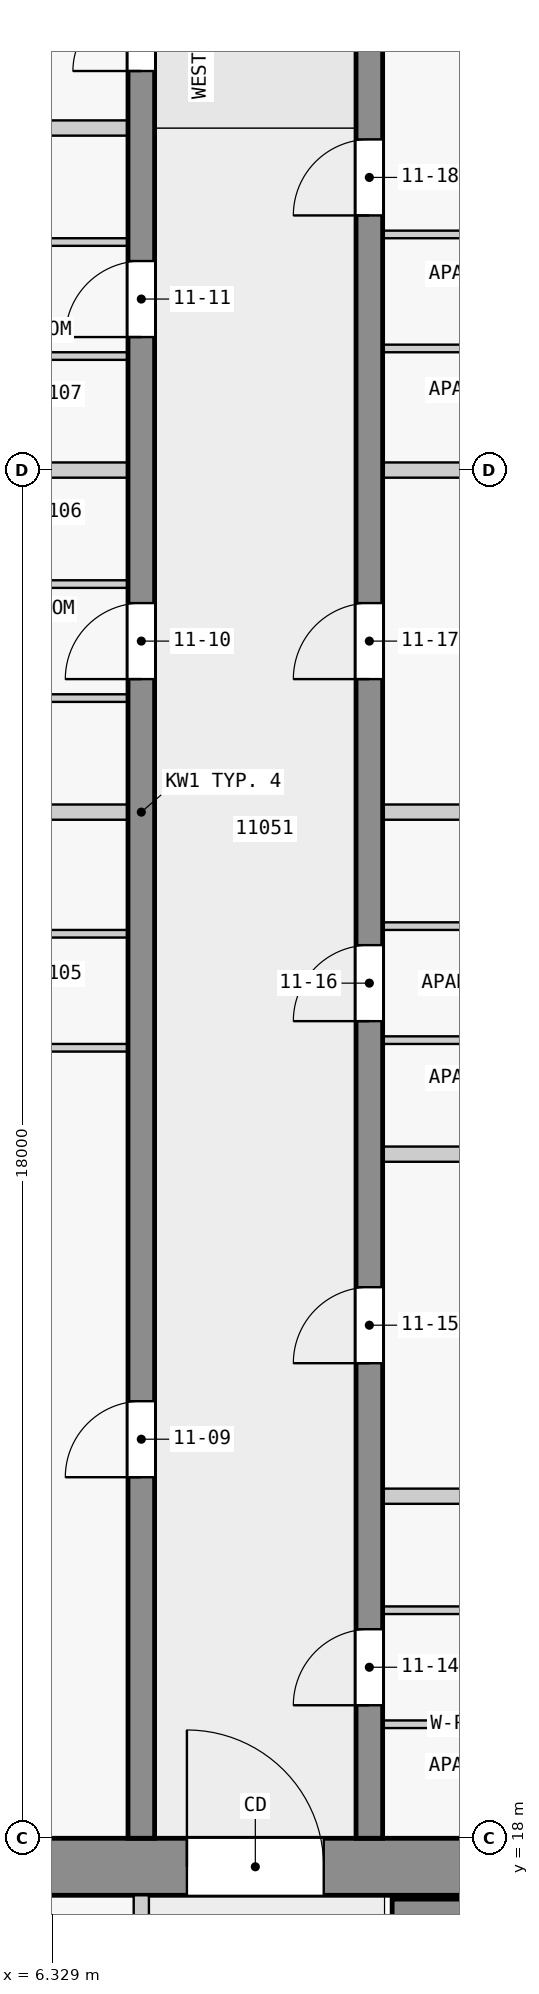
"""IFC4 building model, lengths in metres.
Left out: names, types, materials, properties, quantities, classifications, styles, units other than length and angle.
Written with IfcOpenShell. Run it as: python <this file> out.ifc"""

import sys

from ifc_helpers import new_model, si_unit, direction, frame, frame_2d, origin, place, context, subcontext, project, spatial, rectangle, extrude, element, fill, save


model = new_model("IFC4")
c1 = context("Model", 3, precision=1e-05, world=origin(), true_north=direction((0.0, 1.0)))
c2 = subcontext(c1, "Body", "Model", "MODEL_VIEW")
j1 = project(units=[si_unit("LENGTHUNIT", "METRE"), si_unit("PLANEANGLEUNIT", "RADIAN")], contexts=[c1])
p1 = place(None, origin())
s1 = spatial("IfcSite", under=j1, at=p1, CompositionType="ELEMENT")
p2 = place(p1, origin())
s2 = spatial("IfcBuilding", under=s1, at=p2, CompositionType="ELEMENT")
p3 = place(p2, frame((0.0, 0.0, 47.8)))
s3 = spatial("IfcBuildingStorey", under=s2, at=p3, CompositionType="ELEMENT", Elevation=47.8)
p4 = place(p3, frame((1.55, 17.625, 0.0), z_axis=(0.0, 0.0, 1.0), x_axis=(1.0, 0.0, 0.0)))
e1 = element("IfcWall", 1, at=p4, inside=s3, PredefinedType="SHEAR", context=c2, shape_type="SweptSolid", body=[
    extrude(rectangle(XDim=20.95, YDim=0.75, at=frame_2d((10.475, 0.0))), origin(), (0.0, 0.0, 1.0), 3.25),
])
p5 = place(p4, frame((6.55, 0.0, 0.0)))
e2 = element("IfcOpeningElement", 2, at=p5, cuts=e1, PredefinedType="OPENING", context=c2, shape_type="SweptSolid", body=[
    extrude(rectangle(XDim=1.8, YDim=2.1, at=frame_2d((0.9, 1.05))), frame((0.0, 0.385, 0.0), z_axis=(0.0, -1.0, 0.0), x_axis=(1.0, 0.0, 0.0)), (0.0, 0.0, 1.0), 0.77),
])
p6 = place(p3, frame((10.8, 17.05, 0.0), z_axis=(0.0, 0.0, 1.0), x_axis=(1.0, 0.0, 0.0)))
e3 = element("IfcWall", 3, at=p6, inside=s3, PredefinedType="SHEAR", context=c2, shape_type="SweptSolid", body=[
    extrude(rectangle(XDim=7.8, YDim=0.3, at=frame_2d((3.9, 0.0))), origin(), (0.0, 0.0, 1.0), 3.25),
])
p7 = place(p3, frame((7.5, 18.0, 0.0), z_axis=(0.0, 0.0, 1.0), x_axis=(0.0, 1.0, 0.0)))
e4 = element("IfcWall", 4, at=p7, inside=s3, PredefinedType="SHEAR", context=c2, shape_type="SweptSolid", body=[
    extrude(rectangle(XDim=27.0, YDim=0.35, at=frame_2d((13.5, 0.0))), origin(), (0.0, 0.0, 1.0), 3.25),
])
p8 = place(p7, frame((4.75, 0.0, 0.0)))
e5 = element("IfcOpeningElement", 5, at=p8, cuts=e4, PredefinedType="OPENING", context=c2, shape_type="SweptSolid", body=[
    extrude(rectangle(XDim=1.0, YDim=2.1, at=frame_2d((0.5, 1.05))), frame((0.0, 0.185, 0.0), z_axis=(0.0, -1.0, 0.0), x_axis=(1.0, 0.0, 0.0)), (0.0, 0.0, 1.0), 0.37),
])
p9 = place(p7, frame((15.25, 0.0, 0.0)))
e6 = element("IfcOpeningElement", 6, at=p9, cuts=e4, PredefinedType="OPENING", context=c2, shape_type="SweptSolid", body=[
    extrude(rectangle(XDim=1.0, YDim=2.1, at=frame_2d((0.5, 1.05))), frame((0.0, 0.185, 0.0), z_axis=(0.0, -1.0, 0.0), x_axis=(1.0, 0.0, 0.0)), (0.0, 0.0, 1.0), 0.37),
])
p10 = place(p7, frame((19.75, 0.0, 0.0)))
e7 = element("IfcOpeningElement", 7, at=p10, cuts=e4, PredefinedType="OPENING", context=c2, shape_type="SweptSolid", body=[
    extrude(rectangle(XDim=1.0, YDim=2.1, at=frame_2d((0.5, 1.05))), frame((0.0, 0.185, 0.0), z_axis=(0.0, -1.0, 0.0), x_axis=(1.0, 0.0, 0.0)), (0.0, 0.0, 1.0), 0.37),
])
p11 = place(p7, frame((23.25, 0.0, 0.0)))
e8 = element("IfcOpeningElement", 8, at=p11, cuts=e4, PredefinedType="OPENING", context=c2, shape_type="SweptSolid", body=[
    extrude(rectangle(XDim=0.9, YDim=2.1, at=frame_2d((0.45, 1.05))), frame((0.0, 0.185, 0.0), z_axis=(0.0, -1.0, 0.0), x_axis=(1.0, 0.0, 0.0)), (0.0, 0.0, 1.0), 0.37),
])
p12 = place(p7, frame((25.45, 0.0, 0.0)))
e9 = element("IfcOpeningElement", 9, at=p12, cuts=e4, PredefinedType="OPENING", context=c2, shape_type="SweptSolid", body=[
    extrude(rectangle(XDim=1.0, YDim=2.1, at=frame_2d((0.5, 1.05))), frame((0.0, 0.185, 0.0), z_axis=(0.0, -1.0, 0.0), x_axis=(1.0, 0.0, 0.0)), (0.0, 0.0, 1.0), 0.37),
])
p13 = place(p3, frame((10.5, 18.0, 0.0), z_axis=(0.0, 0.0, 1.0), x_axis=(0.0, 1.0, 0.0)))
e10 = element("IfcWall", 10, at=p13, inside=s3, PredefinedType="SHEAR", context=c2, shape_type="SweptSolid", body=[
    extrude(rectangle(XDim=27.0, YDim=0.35, at=frame_2d((13.5, 0.0))), origin(), (0.0, 0.0, 1.0), 3.25),
])
p14 = place(p13, frame((1.75, 0.0, 0.0)))
e11 = element("IfcOpeningElement", 11, at=p14, cuts=e10, PredefinedType="OPENING", context=c2, shape_type="SweptSolid", body=[
    extrude(rectangle(XDim=1.0, YDim=2.1, at=frame_2d((0.5, 1.05))), frame((0.0, 0.185, 0.0), z_axis=(0.0, -1.0, 0.0), x_axis=(1.0, 0.0, 0.0)), (0.0, 0.0, 1.0), 0.37),
])
p15 = place(p13, frame((6.25, 0.0, 0.0)))
e12 = element("IfcOpeningElement", 12, at=p15, cuts=e10, PredefinedType="OPENING", context=c2, shape_type="SweptSolid", body=[
    extrude(rectangle(XDim=1.0, YDim=2.1, at=frame_2d((0.5, 1.05))), frame((0.0, 0.185, 0.0), z_axis=(0.0, -1.0, 0.0), x_axis=(1.0, 0.0, 0.0)), (0.0, 0.0, 1.0), 0.37),
])
p16 = place(p13, frame((10.75, 0.0, 0.0)))
e13 = element("IfcOpeningElement", 13, at=p16, cuts=e10, PredefinedType="OPENING", context=c2, shape_type="SweptSolid", body=[
    extrude(rectangle(XDim=1.0, YDim=2.1, at=frame_2d((0.5, 1.05))), frame((0.0, 0.185, 0.0), z_axis=(0.0, -1.0, 0.0), x_axis=(1.0, 0.0, 0.0)), (0.0, 0.0, 1.0), 0.37),
])
p17 = place(p13, frame((15.25, 0.0, 0.0)))
e14 = element("IfcOpeningElement", 14, at=p17, cuts=e10, PredefinedType="OPENING", context=c2, shape_type="SweptSolid", body=[
    extrude(rectangle(XDim=1.0, YDim=2.1, at=frame_2d((0.5, 1.05))), frame((0.0, 0.185, 0.0), z_axis=(0.0, -1.0, 0.0), x_axis=(1.0, 0.0, 0.0)), (0.0, 0.0, 1.0), 0.37),
])
p18 = place(p13, frame((21.35, 0.0, 0.0)))
e15 = element("IfcOpeningElement", 15, at=p18, cuts=e10, PredefinedType="OPENING", context=c2, shape_type="SweptSolid", body=[
    extrude(rectangle(XDim=1.0, YDim=2.1, at=frame_2d((0.5, 1.05))), frame((0.0, 0.185, 0.0), z_axis=(0.0, -1.0, 0.0), x_axis=(1.0, 0.0, 0.0)), (0.0, 0.0, 1.0), 0.37),
])
p19 = place(p3, frame((7.5, 10.1, 0.0), z_axis=(0.0, 0.0, 1.0), x_axis=(0.0, 1.0, 0.0)))
e16 = element("IfcWall", 16, at=p19, inside=s3, PredefinedType="PARTITIONING", context=c2, shape_type="SweptSolid", body=[
    extrude(rectangle(XDim=7.15, YDim=0.2, at=frame_2d((3.575, 0.0))), origin(), (0.0, 0.0, 1.0), 3.25),
])
p20 = place(p19, frame((1.5, 0.0, 0.0)))
e17 = element("IfcOpeningElement", 17, at=p20, cuts=e16, PredefinedType="OPENING", context=c2, shape_type="SweptSolid", body=[
    extrude(rectangle(XDim=0.9, YDim=2.1, at=frame_2d((0.45, 1.05))), frame((0.0, 0.11, 0.0), z_axis=(0.0, -1.0, 0.0), x_axis=(1.0, 0.0, 0.0)), (0.0, 0.0, 1.0), 0.22),
])
p21 = place(p19, frame((5.075, 0.0, 0.0)))
e18 = element("IfcOpeningElement", 18, at=p21, cuts=e16, PredefinedType="OPENING", context=c2, shape_type="SweptSolid", body=[
    extrude(rectangle(XDim=0.9, YDim=2.1, at=frame_2d((0.45, 1.05))), frame((0.0, 0.11, 0.0), z_axis=(0.0, -1.0, 0.0), x_axis=(1.0, 0.0, 0.0)), (0.0, 0.0, 1.0), 0.22),
])
p22 = place(p3, frame((14.075, 19.5, 0.0), z_axis=(0.0, 0.0, 1.0), x_axis=(-1.0, 0.0, 0.0)))
e19 = element("IfcWall", 19, at=p22, inside=s3, PredefinedType="PARTITIONING", context=c2, shape_type="SweptSolid", body=[
    extrude(rectangle(XDim=3.4, YDim=0.1, at=frame_2d((1.7, 0.0))), origin(), (0.0, 0.0, 1.0), 3.25),
])
p23 = place(p22, frame((1.25, 0.0, 0.0)))
e20 = element("IfcOpeningElement", 20, at=p23, cuts=e19, PredefinedType="OPENING", context=c2, shape_type="SweptSolid", body=[
    extrude(rectangle(XDim=0.9, YDim=2.1, at=frame_2d((0.45, 1.05))), frame((0.0, 0.06, 0.0), z_axis=(0.0, -1.0, 0.0), x_axis=(1.0, 0.0, 0.0)), (0.0, 0.0, 1.0), 0.12),
])
p24 = place(p3, frame((10.675, 21.0, 0.0), z_axis=(0.0, 0.0, 1.0), x_axis=(1.0, 0.0, 0.0)))
e21 = element("IfcWall", 21, at=p24, inside=s3, PredefinedType="PARTITIONING", context=c2, shape_type="SweptSolid", body=[
    extrude(rectangle(XDim=3.4, YDim=0.1, at=frame_2d((1.7, 0.0))), origin(), (0.0, 0.0, 1.0), 3.25),
])
p25 = place(p24, frame((1.25, 0.0, 0.0)))
e22 = element("IfcOpeningElement", 22, at=p25, cuts=e21, PredefinedType="OPENING", context=c2, shape_type="SweptSolid", body=[
    extrude(rectangle(XDim=0.9, YDim=2.1, at=frame_2d((0.45, 1.05))), frame((0.0, 0.06, 0.0), z_axis=(0.0, -1.0, 0.0), x_axis=(1.0, 0.0, 0.0)), (0.0, 0.0, 1.0), 0.12),
])
p26 = place(p3, frame((13.975, 22.5, 0.0), z_axis=(0.0, 0.0, 1.0), x_axis=(-1.0, 0.0, 0.0)))
e23 = element("IfcWall", 23, at=p26, inside=s3, PredefinedType="PARTITIONING", context=c2, shape_type="SweptSolid", body=[
    extrude(rectangle(XDim=3.3, YDim=0.2, at=frame_2d((1.65, 0.0))), origin(), (0.0, 0.0, 1.0), 3.25),
])
p27 = place(p3, frame((18.08, 27.0, 0.0), z_axis=(0.0, 0.0, 1.0), x_axis=(-1.0, 0.0, 0.0)))
e24 = element("IfcWall", 24, at=p27, inside=s3, PredefinedType="PARTITIONING", context=c2, shape_type="SweptSolid", body=[
    extrude(rectangle(XDim=7.405, YDim=0.2, at=frame_2d((3.703, 0.0))), origin(), (0.0, 0.0, 1.0), 3.25),
])
p28 = place(p3, frame((3.975, 28.4, 0.0), z_axis=(0.0, 0.0, 1.0), x_axis=(1.0, 0.0, 0.0)))
e25 = element("IfcWall", 25, at=p28, inside=s3, PredefinedType="PARTITIONING", context=c2, shape_type="SweptSolid", body=[
    extrude(rectangle(XDim=3.35, YDim=0.1, at=frame_2d((1.675, 0.0))), origin(), (0.0, 0.0, 1.0), 3.25),
])
p29 = place(p28, frame((1.25, 0.0, 0.0)))
e26 = element("IfcOpeningElement", 26, at=p29, cuts=e25, PredefinedType="OPENING", context=c2, shape_type="SweptSolid", body=[
    extrude(rectangle(XDim=0.9, YDim=2.1, at=frame_2d((0.45, 1.05))), frame((0.0, 0.06, 0.0), z_axis=(0.0, -1.0, 0.0), x_axis=(1.0, 0.0, 0.0)), (0.0, 0.0, 1.0), 0.12),
])
p30 = place(p3, frame((14.075, 28.5, 0.0), z_axis=(0.0, 0.0, 1.0), x_axis=(-1.0, 0.0, 0.0)))
e27 = element("IfcWall", 27, at=p30, inside=s3, PredefinedType="PARTITIONING", context=c2, shape_type="SweptSolid", body=[
    extrude(rectangle(XDim=3.4, YDim=0.1, at=frame_2d((1.7, 0.0))), origin(), (0.0, 0.0, 1.0), 3.25),
])
p31 = place(p30, frame((1.25, 0.0, 0.0)))
e28 = element("IfcOpeningElement", 28, at=p31, cuts=e27, PredefinedType="OPENING", context=c2, shape_type="SweptSolid", body=[
    extrude(rectangle(XDim=0.9, YDim=2.1, at=frame_2d((0.45, 1.05))), frame((0.0, 0.06, 0.0), z_axis=(0.0, -1.0, 0.0), x_axis=(1.0, 0.0, 0.0)), (0.0, 0.0, 1.0), 0.12),
])
p32 = place(p3, frame((7.325, 29.9, 0.0), z_axis=(0.0, 0.0, 1.0), x_axis=(-1.0, 0.0, 0.0)))
e29 = element("IfcWall", 29, at=p32, inside=s3, PredefinedType="PARTITIONING", context=c2, shape_type="SweptSolid", body=[
    extrude(rectangle(XDim=3.35, YDim=0.1, at=frame_2d((1.675, 0.0))), origin(), (0.0, 0.0, 1.0), 3.25),
])
p33 = place(p3, frame((10.675, 30.0, 0.0), z_axis=(0.0, 0.0, 1.0), x_axis=(1.0, 0.0, 0.0)))
e30 = element("IfcWall", 30, at=p33, inside=s3, PredefinedType="PARTITIONING", context=c2, shape_type="SweptSolid", body=[
    extrude(rectangle(XDim=3.4, YDim=0.1, at=frame_2d((1.7, 0.0))), origin(), (0.0, 0.0, 1.0), 3.25),
])
p34 = place(p33, frame((1.25, 0.0, 0.0)))
e31 = element("IfcOpeningElement", 31, at=p34, cuts=e30, PredefinedType="OPENING", context=c2, shape_type="SweptSolid", body=[
    extrude(rectangle(XDim=0.9, YDim=2.1, at=frame_2d((0.45, 1.05))), frame((0.0, 0.06, 0.0), z_axis=(0.0, -1.0, 0.0), x_axis=(1.0, 0.0, 0.0)), (0.0, 0.0, 1.0), 0.12),
])
for number, where, z_axis, x_axis in (
    (32, (7.325, 31.5, 0.0), (0.0, 0.0, 1.0), (-1.0, 0.0, 0.0)),
    (33, (13.975, 31.5, 0.0), (0.0, 0.0, 1.0), (-1.0, 0.0, 0.0)),
):
    element("IfcWall", number, at=place(p3, frame(where, z_axis=z_axis, x_axis=x_axis)), inside=s3, PredefinedType="PARTITIONING", context=c2, shape_type="SweptSolid", body=[
        extrude(rectangle(XDim=3.3, YDim=0.2, at=frame_2d((1.65, 0.0))), origin(), (0.0, 0.0, 1.0), 3.25),
    ])
p35 = place(p3, frame((7.325, 33.0, 0.0), z_axis=(0.0, 0.0, 1.0), x_axis=(-1.0, 0.0, 0.0)))
e34 = element("IfcWall", 34, at=p35, inside=s3, PredefinedType="PARTITIONING", context=c2, shape_type="SweptSolid", body=[
    extrude(rectangle(XDim=3.35, YDim=0.1, at=frame_2d((1.675, 0.0))), origin(), (0.0, 0.0, 1.0), 3.25),
])
p36 = place(p35, frame((1.25, 0.0, 0.0)))
e35 = element("IfcOpeningElement", 35, at=p36, cuts=e34, PredefinedType="OPENING", context=c2, shape_type="SweptSolid", body=[
    extrude(rectangle(XDim=0.9, YDim=2.1, at=frame_2d((0.45, 1.05))), frame((0.0, 0.06, 0.0), z_axis=(0.0, -1.0, 0.0), x_axis=(1.0, 0.0, 0.0)), (0.0, 0.0, 1.0), 0.12),
])
p37 = place(p3, frame((3.925, 34.5, 0.0), z_axis=(0.0, 0.0, 1.0), x_axis=(1.0, 0.0, 0.0)))
e36 = element("IfcWall", 36, at=p37, inside=s3, PredefinedType="PARTITIONING", context=c2, shape_type="SweptSolid", body=[
    extrude(rectangle(XDim=3.4, YDim=0.1, at=frame_2d((1.7, 0.0))), origin(), (0.0, 0.0, 1.0), 3.25),
])
p38 = place(p37, frame((1.25, 0.0, 0.0)))
e37 = element("IfcOpeningElement", 37, at=p38, cuts=e36, PredefinedType="OPENING", context=c2, shape_type="SweptSolid", body=[
    extrude(rectangle(XDim=0.9, YDim=2.1, at=frame_2d((0.45, 1.05))), frame((0.0, 0.06, 0.0), z_axis=(0.0, -1.0, 0.0), x_axis=(1.0, 0.0, 0.0)), (0.0, 0.0, 1.0), 0.12),
])
p39 = place(p3, frame((7.325, 36.0, 0.0), z_axis=(0.0, 0.0, 1.0), x_axis=(-1.0, 0.0, 0.0)))
e38 = element("IfcWall", 38, at=p39, inside=s3, PredefinedType="PARTITIONING", context=c2, shape_type="SweptSolid", body=[
    extrude(rectangle(XDim=3.4, YDim=0.2, at=frame_2d((1.7, 0.0))), origin(), (0.0, 0.0, 1.0), 3.25),
])
p40 = place(p3, frame((16.6, 36.0, 0.0), z_axis=(0.0, 0.0, 1.0), x_axis=(-1.0, 0.0, 0.0)))
e39 = element("IfcWall", 39, at=p40, inside=s3, PredefinedType="PARTITIONING", context=c2, shape_type="SweptSolid", body=[
    extrude(rectangle(XDim=5.925, YDim=0.2, at=frame_2d((2.962, 0.0))), origin(), (0.0, 0.0, 1.0), 3.25),
])
p41 = place(p3, frame((7.325, 37.5, 0.0), z_axis=(0.0, 0.0, 1.0), x_axis=(-1.0, 0.0, 0.0)))
e40 = element("IfcWall", 40, at=p41, inside=s3, PredefinedType="PARTITIONING", context=c2, shape_type="SweptSolid", body=[
    extrude(rectangle(XDim=3.4, YDim=0.1, at=frame_2d((1.7, 0.0))), origin(), (0.0, 0.0, 1.0), 3.25),
])
p42 = place(p41, frame((1.25, 0.0, 0.0)))
e41 = element("IfcOpeningElement", 41, at=p42, cuts=e40, PredefinedType="OPENING", context=c2, shape_type="SweptSolid", body=[
    extrude(rectangle(XDim=0.9, YDim=2.1, at=frame_2d((0.45, 1.05))), frame((0.0, 0.06, 0.0), z_axis=(0.0, -1.0, 0.0), x_axis=(1.0, 0.0, 0.0)), (0.0, 0.0, 1.0), 0.12),
])
p43 = place(p3, frame((14.075, 37.6, 0.0), z_axis=(0.0, 0.0, 1.0), x_axis=(-1.0, 0.0, 0.0)))
e42 = element("IfcWall", 42, at=p43, inside=s3, PredefinedType="PARTITIONING", context=c2, shape_type="SweptSolid", body=[
    extrude(rectangle(XDim=3.4, YDim=0.1, at=frame_2d((1.7, 0.0))), origin(), (0.0, 0.0, 1.0), 3.25),
])
p44 = place(p3, frame((3.925, 39.0, 0.0), z_axis=(0.0, 0.0, 1.0), x_axis=(1.0, 0.0, 0.0)))
e43 = element("IfcWall", 43, at=p44, inside=s3, PredefinedType="PARTITIONING", context=c2, shape_type="SweptSolid", body=[
    extrude(rectangle(XDim=3.4, YDim=0.1, at=frame_2d((1.7, 0.0))), origin(), (0.0, 0.0, 1.0), 3.25),
])
p45 = place(p44, frame((1.25, 0.0, 0.0)))
e44 = element("IfcOpeningElement", 44, at=p45, cuts=e43, PredefinedType="OPENING", context=c2, shape_type="SweptSolid", body=[
    extrude(rectangle(XDim=0.9, YDim=2.1, at=frame_2d((0.45, 1.05))), frame((0.0, 0.06, 0.0), z_axis=(0.0, -1.0, 0.0), x_axis=(1.0, 0.0, 0.0)), (0.0, 0.0, 1.0), 0.12),
])
p46 = place(p3, frame((14.075, 39.1, 0.0), z_axis=(0.0, 0.0, 1.0), x_axis=(-1.0, 0.0, 0.0)))
e45 = element("IfcWall", 45, at=p46, inside=s3, PredefinedType="PARTITIONING", context=c2, shape_type="SweptSolid", body=[
    extrude(rectangle(XDim=3.4, YDim=0.1, at=frame_2d((1.7, 0.0))), origin(), (0.0, 0.0, 1.0), 3.25),
])
p47 = place(p46, frame((1.25, 0.0, 0.0)))
e46 = element("IfcOpeningElement", 46, at=p47, cuts=e45, PredefinedType="OPENING", context=c2, shape_type="SweptSolid", body=[
    extrude(rectangle(XDim=0.9, YDim=2.1, at=frame_2d((0.45, 1.05))), frame((0.0, 0.06, 0.0), z_axis=(0.0, -1.0, 0.0), x_axis=(1.0, 0.0, 0.0)), (0.0, 0.0, 1.0), 0.12),
])
p48 = place(p3, frame((7.325, 40.5, 0.0), z_axis=(0.0, 0.0, 1.0), x_axis=(-1.0, 0.0, 0.0)))
e47 = element("IfcWall", 47, at=p48, inside=s3, PredefinedType="PARTITIONING", context=c2, shape_type="SweptSolid", body=[
    extrude(rectangle(XDim=3.3, YDim=0.2, at=frame_2d((1.65, 0.0))), origin(), (0.0, 0.0, 1.0), 3.25),
])
p49 = place(p5, origin())
e48 = element("IfcDoor", 48, at=p49, inside=s3, OperationType="DOUBLE_DOOR_SINGLE_SWING", PredefinedType="DOOR", context=c2, shape_type="SweptSolid", body=[
    extrude(rectangle(XDim=1.8, YDim=2.1, at=frame_2d((0.9, 1.05))), frame((0.0, 0.025, 0.0), z_axis=(0.0, -1.0, 0.0), x_axis=(1.0, 0.0, 0.0)), (0.0, 0.0, 1.0), 0.05),
])
fill(e2, e48)
p50 = place(p8, origin())
e49 = element("IfcDoor", 49, at=p50, inside=s3, OperationType="SINGLE_SWING_LEFT", PredefinedType="DOOR", context=c2, shape_type="SweptSolid", body=[
    extrude(rectangle(XDim=1.0, YDim=2.1, at=frame_2d((0.5, 1.05))), frame((0.0, 0.025, 0.0), z_axis=(0.0, -1.0, 0.0), x_axis=(1.0, 0.0, 0.0)), (0.0, 0.0, 1.0), 0.05),
])
fill(e5, e49)
p51 = place(p9, origin())
e50 = element("IfcDoor", 50, at=p51, inside=s3, OperationType="SINGLE_SWING_RIGHT", PredefinedType="DOOR", context=c2, shape_type="SweptSolid", body=[
    extrude(rectangle(XDim=1.0, YDim=2.1, at=frame_2d((0.5, 1.05))), frame((0.0, 0.025, 0.0), z_axis=(0.0, -1.0, 0.0), x_axis=(1.0, 0.0, 0.0)), (0.0, 0.0, 1.0), 0.05),
])
fill(e6, e50)
p52 = place(p10, origin())
e51 = element("IfcDoor", 51, at=p52, inside=s3, OperationType="SINGLE_SWING_RIGHT", PredefinedType="DOOR", context=c2, shape_type="SweptSolid", body=[
    extrude(rectangle(XDim=1.0, YDim=2.1, at=frame_2d((0.5, 1.05))), frame((0.0, 0.025, 0.0), z_axis=(0.0, -1.0, 0.0), x_axis=(1.0, 0.0, 0.0)), (0.0, 0.0, 1.0), 0.05),
])
fill(e7, e51)
p53 = place(p11, origin())
e52 = element("IfcDoor", 52, at=p53, inside=s3, OperationType="SINGLE_SWING_RIGHT", PredefinedType="DOOR", context=c2, shape_type="SweptSolid", body=[
    extrude(rectangle(XDim=0.9, YDim=2.1, at=frame_2d((0.45, 1.05))), frame((0.0, 0.025, 0.0), z_axis=(0.0, -1.0, 0.0), x_axis=(1.0, 0.0, 0.0)), (0.0, 0.0, 1.0), 0.05),
])
fill(e8, e52)
p54 = place(p14, origin())
e53 = element("IfcDoor", 53, at=p54, inside=s3, OperationType="SINGLE_SWING_LEFT", PredefinedType="DOOR", context=c2, shape_type="SweptSolid", body=[
    extrude(rectangle(XDim=1.0, YDim=2.1, at=frame_2d((0.5, 1.05))), frame((0.0, 0.025, 0.0), z_axis=(0.0, -1.0, 0.0), x_axis=(1.0, 0.0, 0.0)), (0.0, 0.0, 1.0), 0.05),
])
fill(e11, e53)
p55 = place(p15, origin())
e54 = element("IfcDoor", 54, at=p55, inside=s3, OperationType="SINGLE_SWING_LEFT", PredefinedType="DOOR", context=c2, shape_type="SweptSolid", body=[
    extrude(rectangle(XDim=1.0, YDim=2.1, at=frame_2d((0.5, 1.05))), frame((0.0, 0.025, 0.0), z_axis=(0.0, -1.0, 0.0), x_axis=(1.0, 0.0, 0.0)), (0.0, 0.0, 1.0), 0.05),
])
fill(e12, e54)
p56 = place(p16, origin())
e55 = element("IfcDoor", 55, at=p56, inside=s3, OperationType="SINGLE_SWING_LEFT", PredefinedType="DOOR", context=c2, shape_type="SweptSolid", body=[
    extrude(rectangle(XDim=1.0, YDim=2.1, at=frame_2d((0.5, 1.05))), frame((0.0, 0.025, 0.0), z_axis=(0.0, -1.0, 0.0), x_axis=(1.0, 0.0, 0.0)), (0.0, 0.0, 1.0), 0.05),
])
fill(e13, e55)
p57 = place(p17, origin())
e56 = element("IfcDoor", 56, at=p57, inside=s3, OperationType="SINGLE_SWING_RIGHT", PredefinedType="DOOR", context=c2, shape_type="SweptSolid", body=[
    extrude(rectangle(XDim=1.0, YDim=2.1, at=frame_2d((0.5, 1.05))), frame((0.0, 0.025, 0.0), z_axis=(0.0, -1.0, 0.0), x_axis=(1.0, 0.0, 0.0)), (0.0, 0.0, 1.0), 0.05),
])
fill(e14, e56)
p58 = place(p18, origin())
e57 = element("IfcDoor", 57, at=p58, inside=s3, OperationType="SINGLE_SWING_RIGHT", PredefinedType="DOOR", context=c2, shape_type="SweptSolid", body=[
    extrude(rectangle(XDim=1.0, YDim=2.1, at=frame_2d((0.5, 1.05))), frame((0.0, 0.025, 0.0), z_axis=(0.0, -1.0, 0.0), x_axis=(1.0, 0.0, 0.0)), (0.0, 0.0, 1.0), 0.05),
])
fill(e15, e57)
save(model, sys.argv[1])
